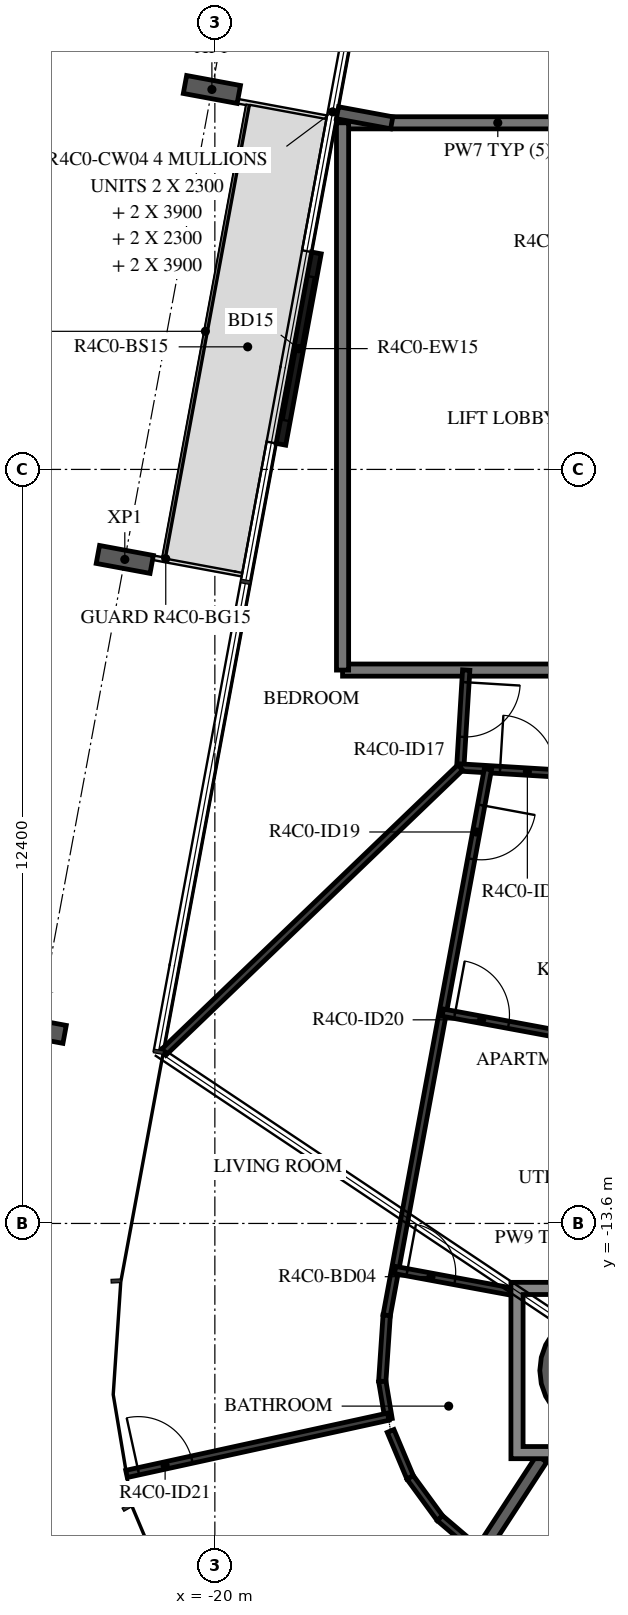
"""IFC4 building model, lengths in metres.
Left out: names, types, materials, properties, quantities, classifications, styles, units other than length and angle.
Written with IfcOpenShell. Run it as: python <this file> out.ifc"""

import sys

from ifc_helpers import new_model, si_unit, direction, frame, frame_2d, origin, origin_2d, place, context, subcontext, project, spatial, polyline, rectangle, hollow_circle, i_section, outline, extrude, element, fill, save


model = new_model("IFC4")
c1 = context("Model", 3, precision=1e-05, world=origin(), true_north=direction((0.0, 1.0)))
c2 = subcontext(c1, "Body", "Model", "MODEL_VIEW")
j1 = project(units=[si_unit("LENGTHUNIT", "METRE"), si_unit("PLANEANGLEUNIT", "RADIAN")], contexts=[c1])
p1 = place(None, origin())
s1 = spatial("IfcSite", under=j1, at=p1, CompositionType="ELEMENT")
p2 = place(p1, origin())
s2 = spatial("IfcBuilding", under=s1, at=p2, CompositionType="ELEMENT")
p3 = place(p2, frame((0.0, 0.0, 179.7)))
s3 = spatial("IfcBuildingStorey", under=s2, at=p3, CompositionType="ELEMENT", Elevation=179.7)
p4 = place(p3, frame((-13.681, -16.019, -0.38), z_axis=(0.0, 0.0, 1.0), x_axis=(1.0, 0.0, 0.0)))
e1 = element("IfcColumn", 1, at=p4, inside=s3, PredefinedType="COLUMN", context=c2, shape_type="SweptSolid", body=[
    extrude(hollow_circle(Radius=0.975, WallThickness=0.045, at=origin_2d()), origin(), (0.0, 0.0, 1.0), 2.616),
])
for number, where, z_axis, x_axis in (
    (2, (-20.049, 5.048, -0.38), (0.0, 0.0, 1.0), (0.182, 0.983, 0.0)),
    (3, (-21.481, -2.68, -0.38), (0.0, 0.0, 1.0), (0.182, 0.983, 0.0)),
    (4, (-22.914, -10.409, -0.38), (0.0, 0.0, 1.0), (0.182, 0.983, 0.0)),
):
    element("IfcColumn", number, at=place(p3, frame(where, z_axis=z_axis, x_axis=x_axis)), inside=s3, PredefinedType="COLUMN", context=c2, shape_type="SweptSolid", body=[
        extrude(i_section(OverallWidth=0.3, OverallDepth=0.9, WebThickness=0.019, FlangeThickness=0.035, FilletRadius=0.03, at=origin_2d()), origin(), (0.0, 0.0, 1.0), 2.616),
    ])
p5 = place(p3, frame((-18.33, 2.36, 0.0), z_axis=(0.0, 0.0, 1.0), x_axis=(-0.18226136951, -0.983250117307, 0.0)))
e5 = element("IfcWall", 5, at=p5, inside=s3, PredefinedType="STANDARD", context=c2, shape_type="SweptSolid", body=[
    extrude(rectangle(XDim=3.2, YDim=0.16, at=frame_2d((1.6, 0.0))), origin(), (0.0, 0.0, 1.0), 3.05),
])
p6 = place(p5, frame((0.4, 0.0, 0.0)))
e6 = element("IfcOpeningElement", 6, at=p6, cuts=e5, PredefinedType="OPENING", context=c2, shape_type="SweptSolid", body=[
    extrude(rectangle(XDim=2.4, YDim=2.4, at=frame_2d((1.2, 1.2))), frame((0.0, 0.09, 0.0), z_axis=(0.0, -1.0, 0.0), x_axis=(1.0, 0.0, 0.0)), (0.0, 0.0, 1.0), 0.18),
])
p7 = place(p3, frame((-12.794, 4.5, 0.0), z_axis=(0.0, 0.0, 1.0), x_axis=(-1.0, 0.0, 0.0)))
e7 = element("IfcWall", 7, at=p7, inside=s3, PredefinedType="STANDARD", context=c2, shape_type="SweptSolid", body=[
    extrude(rectangle(XDim=5.106, YDim=0.2, at=frame_2d((2.553, 0.0))), origin(), (0.0, 0.0, 1.0), 3.05),
])
p8 = place(p3, frame((-17.9, -4.5, 0.0), z_axis=(0.0, 0.0, 1.0), x_axis=(1.0, 0.0, 0.0)))
e8 = element("IfcWall", 8, at=p8, inside=s3, PredefinedType="STANDARD", context=c2, shape_type="SweptSolid", body=[
    extrude(rectangle(XDim=6.789, YDim=0.2, at=frame_2d((3.394, 0.0))), origin(), (0.0, 0.0, 1.0), 3.05),
])
p9 = place(p3, frame((-17.9, 4.5, 0.0), z_axis=(0.0, 0.0, 1.0), x_axis=(0.0, -1.0, 0.0)))
e9 = element("IfcWall", 9, at=p9, inside=s3, PredefinedType="STANDARD", context=c2, shape_type="SweptSolid", body=[
    extrude(rectangle(XDim=9.0, YDim=0.2, at=frame_2d((4.5, 0.0))), origin(), (0.0, 0.0, 1.0), 3.05),
])
p10 = place(p3, frame((-17.984, 4.665, 0.0), z_axis=(0.0, 0.0, 1.0), x_axis=(0.98328378843, -0.182079629313, 0.0)))
e10 = element("IfcWall", 10, at=p10, inside=s3, PredefinedType="STANDARD", context=c2, shape_type="SweptSolid", body=[
    extrude(rectangle(XDim=0.908, YDim=0.2, at=frame_2d((0.454, 0.0))), origin(), (0.0, 0.0, 1.0), 3.05),
])
p11 = place(p3, frame((-18.04, -22.713, 0.0), z_axis=(0.0, 0.0, 1.0), x_axis=(0.545628572271, 0.838027124335, 0.0)))
e11 = element("IfcWall", 11, at=p11, inside=s3, PredefinedType="STANDARD", context=c2, shape_type="SweptSolid", body=[
    extrude(rectangle(XDim=6.258, YDim=0.2, at=frame_2d((3.129, 0.0))), origin(), (0.0, 0.0, 1.0), 3.05),
])
p12 = place(p3, frame((-15.866, -4.5, 0.0), z_axis=(0.0, 0.0, 1.0), x_axis=(-0.060986374837, -0.998138598635, 0.0)))
e12 = element("IfcWall", 12, at=p12, inside=s3, PredefinedType="PARTITIONING", context=c2, shape_type="SweptSolid", body=[
    extrude(rectangle(XDim=1.605, YDim=0.12, at=frame_2d((0.803, 0.0))), origin(), (0.0, 0.0, 1.0), 3.05),
])
p13 = place(p12, frame((0.2, 0.0, 0.0)))
e13 = element("IfcOpeningElement", 13, at=p13, cuts=e12, PredefinedType="OPENING", context=c2, shape_type="SweptSolid", body=[
    extrude(rectangle(XDim=0.9, YDim=2.1, at=frame_2d((0.45, 1.05))), frame((0.0, 0.07, 0.0), z_axis=(0.0, -1.0, 0.0), x_axis=(1.0, 0.0, 0.0)), (0.0, 0.0, 1.0), 0.14),
])
p14 = place(p3, frame((-15.964, -6.102, 0.0), z_axis=(0.0, 0.0, 1.0), x_axis=(0.998145469708, -0.060873814574, 0.0)))
e14 = element("IfcWall", 14, at=p14, inside=s3, PredefinedType="PARTITIONING", context=c2, shape_type="SweptSolid", body=[
    extrude(rectangle(XDim=2.374, YDim=0.12, at=frame_2d((1.187, 0.0))), origin(), (0.0, 0.0, 1.0), 3.05),
])
p15 = place(p14, frame((0.656, 0.0, 0.0)))
e15 = element("IfcOpeningElement", 15, at=p15, cuts=e14, PredefinedType="OPENING", context=c2, shape_type="SweptSolid", body=[
    extrude(rectangle(XDim=0.9, YDim=2.1, at=frame_2d((0.45, 1.05))), frame((0.0, 0.07, 0.0), z_axis=(0.0, -1.0, 0.0), x_axis=(1.0, 0.0, 0.0)), (0.0, 0.0, 1.0), 0.14),
])
p16 = place(p3, frame((-20.849, -10.792, 0.0), z_axis=(0.0, 0.0, 1.0), x_axis=(0.721364983662, 0.692555095531, 0.0)))
e16 = element("IfcWall", 16, at=p16, inside=s3, PredefinedType="PARTITIONING", context=c2, shape_type="SweptSolid", body=[
    extrude(rectangle(XDim=6.771, YDim=0.12, at=frame_2d((3.385, 0.0))), origin(), (0.0, 0.0, 1.0), 3.05),
])
p17 = place(p3, frame((-15.51, -6.13, 0.0), z_axis=(0.0, 0.0, 1.0), x_axis=(-0.182243361628, -0.98325345519, 0.0)))
e17 = element("IfcWall", 17, at=p17, inside=s3, PredefinedType="PARTITIONING", context=c2, shape_type="SweptSolid", body=[
    extrude(rectangle(XDim=9.134, YDim=0.12, at=frame_2d((4.567, 0.0))), origin(), (0.0, 0.0, 1.0), 3.05),
])
p18 = place(p17, frame((0.6, 0.0, 0.0)))
e18 = element("IfcOpeningElement", 18, at=p18, cuts=e17, PredefinedType="OPENING", context=c2, shape_type="SweptSolid", body=[
    extrude(rectangle(XDim=0.9, YDim=2.1, at=frame_2d((0.45, 1.05))), frame((0.0, 0.07, 0.0), z_axis=(0.0, -1.0, 0.0), x_axis=(1.0, 0.0, 0.0)), (0.0, 0.0, 1.0), 0.14),
])
p19 = place(p3, frame((-16.252, -10.133, 0.0), z_axis=(0.0, 0.0, 1.0), x_axis=(0.983256998026, -0.182224246005, 0.0)))
e19 = element("IfcWall", 19, at=p19, inside=s3, PredefinedType="PARTITIONING", context=c2, shape_type="SweptSolid", body=[
    extrude(rectangle(XDim=6.671, YDim=0.12, at=frame_2d((3.335, 0.0))), origin(), (0.0, 0.0, 1.0), 3.05),
])
p20 = place(p19, frame((0.2, 0.0, 0.0)))
e20 = element("IfcOpeningElement", 20, at=p20, cuts=e19, PredefinedType="OPENING", context=c2, shape_type="SweptSolid", body=[
    extrude(rectangle(XDim=0.9, YDim=2.1, at=frame_2d((0.45, 1.05))), frame((0.0, 0.07, 0.0), z_axis=(0.0, -1.0, 0.0), x_axis=(1.0, 0.0, 0.0)), (0.0, 0.0, 1.0), 0.14),
])
p21 = place(p3, frame((-17.143, -16.817, 0.0), z_axis=(0.0, 0.0, 1.0), x_axis=(-0.164964120994, 0.98629956848, 0.0)))
e21 = element("IfcWall", 21, at=p21, inside=s3, PredefinedType="PARTITIONING", context=c2, shape_type="SweptSolid", body=[
    extrude(rectangle(XDim=0.63, YDim=0.12, at=frame_2d((0.315, 0.0))), origin(), (0.0, 0.0, 1.0), 3.05),
])
p22 = place(p3, frame((-17.247, -16.195, 0.0), z_axis=(0.0, 0.0, 1.0), x_axis=(0.066712820538, 0.997772218282, 0.0)))
e22 = element("IfcWall", 22, at=p22, inside=s3, PredefinedType="PARTITIONING", context=c2, shape_type="SweptSolid", body=[
    extrude(rectangle(XDim=1.087, YDim=0.12, at=frame_2d((0.543, 0.0))), origin(), (0.0, 0.0, 1.0), 3.05),
])
p23 = place(p3, frame((-21.453, -17.719, 0.0), z_axis=(0.0, 0.0, 1.0), x_axis=(0.976887361549, 0.213754725903, 0.0)))
e23 = element("IfcWall", 23, at=p23, inside=s3, PredefinedType="PARTITIONING", context=c2, shape_type="SweptSolid", body=[
    extrude(rectangle(XDim=4.405, YDim=0.12, at=frame_2d((2.203, 0.0))), origin(), (0.0, 0.0, 1.0), 3.05),
])
p24 = place(p23, frame((0.2, 0.0, 0.0)))
e24 = element("IfcOpeningElement", 24, at=p24, cuts=e23, PredefinedType="OPENING", context=c2, shape_type="SweptSolid", body=[
    extrude(rectangle(XDim=0.9, YDim=2.1, at=frame_2d((0.45, 1.05))), frame((0.0, 0.07, 0.0), z_axis=(0.0, -1.0, 0.0), x_axis=(1.0, 0.0, 0.0)), (0.0, 0.0, 1.0), 0.14),
])
p25 = place(p3, frame((-17.036, -14.366, 0.0), z_axis=(0.0, 0.0, 1.0), x_axis=(0.983259435886, -0.182211091156, 0.0)))
e25 = element("IfcWall", 25, at=p25, inside=s3, PredefinedType="PARTITIONING", context=c2, shape_type="SweptSolid", body=[
    extrude(rectangle(XDim=1.938, YDim=0.12, at=frame_2d((0.969, 0.0))), origin(), (0.0, 0.0, 1.0), 3.05),
])
p26 = place(p25, frame((0.2, 0.0, 0.0)))
e26 = element("IfcOpeningElement", 26, at=p26, cuts=e25, PredefinedType="OPENING", context=c2, shape_type="SweptSolid", body=[
    extrude(rectangle(XDim=0.8, YDim=2.1, at=frame_2d((0.4, 1.05))), frame((0.0, 0.07, 0.0), z_axis=(0.0, -1.0, 0.0), x_axis=(1.0, 0.0, 0.0)), (0.0, 0.0, 1.0), 0.14),
])
for number, where, z_axis, x_axis in (
    (27, (-17.11, -17.013, 0.0), (0.0, 0.0, 1.0), (0.388, -0.922, 0.0)),
    (28, (-16.788, -17.777, 0.0), (0.0, 0.0, 1.0), (0.59, -0.807, 0.0)),
    (29, (-16.299, -18.446, 0.0), (0.0, 0.0, 1.0), (0.76, -0.649, 0.0)),
):
    element("IfcWall", number, at=place(p3, frame(where, z_axis=z_axis, x_axis=x_axis)), inside=s3, PredefinedType="PARTITIONING", context=c2, shape_type="SweptSolid", body=[
        extrude(rectangle(XDim=0.829, YDim=0.12, at=frame_2d((0.415, 0.0))), origin(), (0.0, 0.0, 1.0), 3.05),
    ])
p27 = place(p3, origin())
e30 = element("IfcWall", 30, at=p27, inside=s3, PredefinedType="STANDARD", context=c2, shape_type="SweptSolid", body=[
    extrude(outline(polyline([(-12.231, -14.569), (-12.231, -17.469), (-15.131, -17.469), (-15.131, -14.569), (-12.231, -14.569)]), holes=[polyline([(-14.931, -17.269), (-12.431, -17.269), (-12.431, -14.769), (-14.931, -14.769), (-14.931, -17.269)])]), origin(), (0.0, 0.0, 1.0), 3.05),
])
p28 = place(p6, origin())
e31 = element("IfcDoor", 31, at=p28, inside=s3, OperationType="DOUBLE_DOOR_SLIDING", PredefinedType="DOOR", context=c2, shape_type="SweptSolid", body=[
    extrude(rectangle(XDim=2.4, YDim=2.4, at=frame_2d((1.2, 1.2))), frame((0.0, 0.025, 0.0), z_axis=(0.0, -1.0, 0.0), x_axis=(1.0, 0.0, 0.0)), (0.0, 0.0, 1.0), 0.05),
])
fill(e6, e31)
p29 = place(p13, origin())
e32 = element("IfcDoor", 32, at=p29, inside=s3, OperationType="SINGLE_SWING_RIGHT", PredefinedType="DOOR", context=c2, shape_type="SweptSolid", body=[
    extrude(rectangle(XDim=0.9, YDim=2.1, at=frame_2d((0.45, 1.05))), frame((0.0, 0.025, 0.0), z_axis=(0.0, -1.0, 0.0), x_axis=(1.0, 0.0, 0.0)), (0.0, 0.0, 1.0), 0.05),
])
fill(e13, e32)
p30 = place(p15, origin())
e33 = element("IfcDoor", 33, at=p30, inside=s3, OperationType="SINGLE_SWING_RIGHT", PredefinedType="DOOR", context=c2, shape_type="SweptSolid", body=[
    extrude(rectangle(XDim=0.9, YDim=2.1, at=frame_2d((0.45, 1.05))), frame((0.0, 0.025, 0.0), z_axis=(0.0, -1.0, 0.0), x_axis=(1.0, 0.0, 0.0)), (0.0, 0.0, 1.0), 0.05),
])
fill(e15, e33)
p31 = place(p18, origin())
e34 = element("IfcDoor", 34, at=p31, inside=s3, OperationType="SINGLE_SWING_RIGHT", PredefinedType="DOOR", context=c2, shape_type="SweptSolid", body=[
    extrude(rectangle(XDim=0.9, YDim=2.1, at=frame_2d((0.45, 1.05))), frame((0.0, 0.025, 0.0), z_axis=(0.0, -1.0, 0.0), x_axis=(1.0, 0.0, 0.0)), (0.0, 0.0, 1.0), 0.05),
])
fill(e18, e34)
p32 = place(p20, origin())
e35 = element("IfcDoor", 35, at=p32, inside=s3, OperationType="SINGLE_SWING_RIGHT", PredefinedType="DOOR", context=c2, shape_type="SweptSolid", body=[
    extrude(rectangle(XDim=0.9, YDim=2.1, at=frame_2d((0.45, 1.05))), frame((0.0, 0.025, 0.0), z_axis=(0.0, -1.0, 0.0), x_axis=(1.0, 0.0, 0.0)), (0.0, 0.0, 1.0), 0.05),
])
fill(e20, e35)
p33 = place(p26, origin())
e36 = element("IfcDoor", 36, at=p33, inside=s3, OperationType="SINGLE_SWING_RIGHT", PredefinedType="DOOR", context=c2, shape_type="SweptSolid", body=[
    extrude(rectangle(XDim=0.8, YDim=2.1, at=frame_2d((0.4, 1.05))), frame((0.0, 0.025, 0.0), z_axis=(0.0, -1.0, 0.0), x_axis=(1.0, 0.0, 0.0)), (0.0, 0.0, 1.0), 0.05),
])
fill(e26, e36)
p34 = place(p24, origin())
e37 = element("IfcDoor", 37, at=p34, inside=s3, OperationType="SINGLE_SWING_RIGHT", PredefinedType="DOOR", context=c2, shape_type="SweptSolid", body=[
    extrude(rectangle(XDim=0.9, YDim=2.1, at=frame_2d((0.45, 1.05))), frame((0.0, 0.025, 0.0), z_axis=(0.0, -1.0, 0.0), x_axis=(1.0, 0.0, 0.0)), (0.0, 0.0, 1.0), 0.05),
])
fill(e24, e37)
save(model, sys.argv[1])
